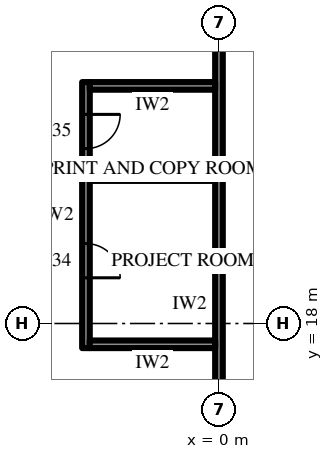
"""IFC4 building model, lengths in metres.
Left out: names, types, materials, properties, quantities, classifications, styles, units other than length and angle.
Written with IfcOpenShell. Run it as: python <this file> out.ifc"""

import sys

from ifc_helpers import new_model, si_unit, direction, frame, frame_2d, origin, place, context, subcontext, project, spatial, rectangle, extrude, element, fill, save


model = new_model("IFC4")
c1 = context("Model", 3, precision=1e-05, world=origin(), true_north=direction((0.0, 1.0)))
c2 = subcontext(c1, "Body", "Model", "MODEL_VIEW")
j1 = project(units=[si_unit("LENGTHUNIT", "METRE"), si_unit("PLANEANGLEUNIT", "RADIAN")], contexts=[c1])
p1 = place(None, origin())
s1 = spatial("IfcSite", under=j1, at=p1, CompositionType="ELEMENT")
p2 = place(p1, origin())
s2 = spatial("IfcBuilding", under=s1, at=p2, CompositionType="ELEMENT")
p3 = place(p2, frame((0.0, 0.0, 265.9)))
s3 = spatial("IfcBuildingStorey", under=s2, at=p3, CompositionType="ELEMENT", Elevation=265.9)
p4 = place(p3, frame((0.0, 12.3, 0.0), z_axis=(0.0, 0.0, 1.0), x_axis=(0.0, 1.0, 0.0)))
e1 = element("IfcWall", 1, at=p4, inside=s3, PredefinedType="PARTITIONING", context=c2, shape_type="SweptSolid", body=[
    extrude(rectangle(XDim=15.55, YDim=0.2, at=frame_2d((7.775, 0.0))), origin(), (0.0, 0.0, 1.0), 2.992),
])
p5 = place(p4, frame((1.055, 0.0, 0.0)))
e2 = element("IfcOpeningElement", 2, at=p5, cuts=e1, PredefinedType="OPENING", context=c2, shape_type="SweptSolid", body=[
    extrude(rectangle(XDim=1.0, YDim=2.2, at=frame_2d((0.5, 1.1))), frame((0.0, 0.11, 0.0), z_axis=(0.0, -1.0, 0.0), x_axis=(1.0, 0.0, 0.0)), (0.0, 0.0, 1.0), 0.22),
])
p6 = place(p3, frame((-3.5, 17.353, 0.0), z_axis=(0.0, 0.0, 1.0), x_axis=(0.0, 1.0, 0.0)))
e3 = element("IfcWall", 3, at=p6, inside=s3, PredefinedType="PARTITIONING", context=c2, shape_type="SweptSolid", body=[
    extrude(rectangle(XDim=7.0, YDim=0.2, at=frame_2d((3.5, 0.0))), origin(), (0.0, 0.0, 1.0), 4.0),
])
p7 = place(p6, frame((1.85, 0.0, 0.0)))
e4 = element("IfcOpeningElement", 4, at=p7, cuts=e3, PredefinedType="OPENING", context=c2, shape_type="SweptSolid", body=[
    extrude(rectangle(XDim=0.9, YDim=2.2, at=frame_2d((0.45, 1.1))), frame((0.0, 0.11, 0.0), z_axis=(0.0, -1.0, 0.0), x_axis=(1.0, 0.0, 0.0)), (0.0, 0.0, 1.0), 0.22),
])
p8 = place(p6, frame((5.25, 0.0, 0.0)))
e5 = element("IfcOpeningElement", 5, at=p8, cuts=e3, PredefinedType="OPENING", context=c2, shape_type="SweptSolid", body=[
    extrude(rectangle(XDim=0.9, YDim=2.2, at=frame_2d((0.45, 1.1))), frame((0.0, 0.11, 0.0), z_axis=(0.0, -1.0, 0.0), x_axis=(1.0, 0.0, 0.0)), (0.0, 0.0, 1.0), 0.22),
])
for number, where, z_axis, x_axis in (
    (6, (-0.1, 17.452, 0.0), (0.0, 0.0, 1.0), (-1.0, 0.0, 0.0)),
    (7, (-0.1, 21.853, 0.0), (0.0, 0.0, 1.0), (-1.0, 0.0, 0.0)),
    (8, (-0.1, 24.252, 0.0), (0.0, 0.0, 1.0), (-1.0, 0.0, 0.0)),
):
    element("IfcWall", number, at=place(p3, frame(where, z_axis=z_axis, x_axis=x_axis)), inside=s3, PredefinedType="PARTITIONING", context=c2, shape_type="SweptSolid", body=[
        extrude(rectangle(XDim=3.3, YDim=0.2, at=frame_2d((1.65, 0.0))), origin(), (0.0, 0.0, 1.0), 4.0),
    ])
p9 = place(p7, frame((0.9, 0.0, 0.0), z_axis=(0.0, 0.0, 1.0), x_axis=(-1.0, 0.0, 0.0)))
e9 = element("IfcDoor", 9, at=p9, inside=s3, OperationType="SINGLE_SWING_LEFT", PredefinedType="DOOR", context=c2, shape_type="SweptSolid", body=[
    extrude(rectangle(XDim=0.9, YDim=2.2, at=frame_2d((0.45, 1.1))), frame((0.0, 0.025, 0.0), z_axis=(0.0, -1.0, 0.0), x_axis=(1.0, 0.0, 0.0)), (0.0, 0.0, 1.0), 0.05),
])
fill(e4, e9)
p10 = place(p8, frame((0.9, 0.0, 0.0), z_axis=(0.0, 0.0, 1.0), x_axis=(-1.0, 0.0, 0.0)))
e10 = element("IfcDoor", 10, at=p10, inside=s3, OperationType="SINGLE_SWING_RIGHT", PredefinedType="DOOR", context=c2, shape_type="SweptSolid", body=[
    extrude(rectangle(XDim=0.9, YDim=2.2, at=frame_2d((0.45, 1.1))), frame((0.0, 0.025, 0.0), z_axis=(0.0, -1.0, 0.0), x_axis=(1.0, 0.0, 0.0)), (0.0, 0.0, 1.0), 0.05),
])
fill(e5, e10)
save(model, sys.argv[1])
